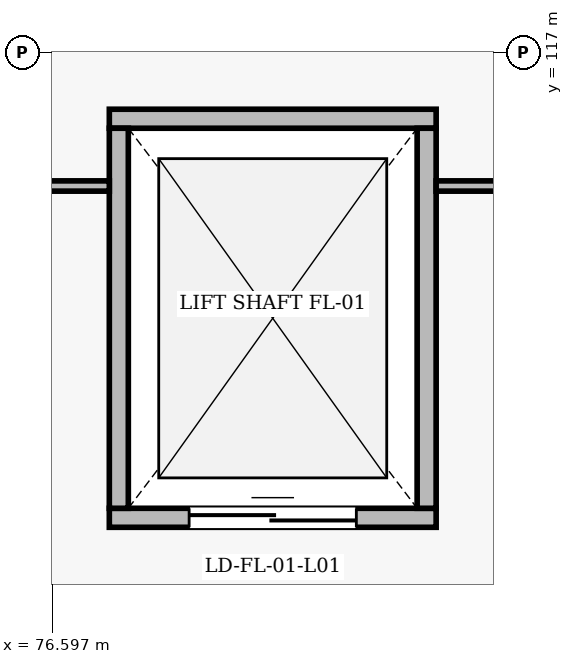
"""IFC4 building model, lengths in metres.
Left out: names, types, materials, properties, quantities, classifications, styles, units other than length and angle.
Written with IfcOpenShell. Run it as: python <this file> out.ifc"""

import sys

from ifc_helpers import new_model, si_unit, direction, frame, frame_2d, origin, place, context, subcontext, project, spatial, rectangle, extrude, element, fill, save


model = new_model("IFC4")
c1 = context("Model", 3, precision=1e-05, world=origin(), true_north=direction((0.0, 1.0)))
c2 = subcontext(c1, "Body", "Model", "MODEL_VIEW")
j1 = project(units=[si_unit("LENGTHUNIT", "METRE"), si_unit("PLANEANGLEUNIT", "RADIAN")], contexts=[c1])
p1 = place(None, origin())
s1 = spatial("IfcSite", under=j1, at=p1, CompositionType="ELEMENT")
p2 = place(p1, origin())
s2 = spatial("IfcBuilding", under=s1, at=p2, CompositionType="ELEMENT")
p3 = place(p2, frame((0.0, 0.0, 5.4)))
s3 = spatial("IfcBuildingStorey", under=s2, at=p3, CompositionType="ELEMENT", Elevation=5.4)
p4 = place(p3, frame((77.35, 110.875, 0.0), z_axis=(0.0, 0.0, 1.0), x_axis=(1.0, 0.0, 0.0)))
e1 = element("IfcWall", 1, at=p4, inside=s3, PredefinedType="SOLIDWALL", context=c2, shape_type="SweptSolid", body=[
    extrude(rectangle(XDim=4.3, YDim=0.25, at=frame_2d((2.15, 0.0))), origin(), (0.0, 0.0, 1.0), 4.582),
])
p5 = place(p4, frame((1.05, 0.0, 0.0)))
e2 = element("IfcOpeningElement", 2, at=p5, cuts=e1, PredefinedType="OPENING", context=c2, shape_type="SweptSolid", body=[
    extrude(rectangle(XDim=2.2, YDim=2.5, at=frame_2d((1.1, 1.25))), frame((0.0, 0.135, 0.0), z_axis=(0.0, -1.0, 0.0), x_axis=(1.0, 0.0, 0.0)), (0.0, 0.0, 1.0), 0.27),
])
p6 = place(p3, frame((81.65, 116.125, 0.0), z_axis=(0.0, 0.0, 1.0), x_axis=(-1.0, 0.0, 0.0)))
e3 = element("IfcWall", 3, at=p6, inside=s3, PredefinedType="SOLIDWALL", context=c2, shape_type="SweptSolid", body=[
    extrude(rectangle(XDim=4.3, YDim=0.25, at=frame_2d((2.15, 0.0))), origin(), (0.0, 0.0, 1.0), 5.16),
])
for number, where, z_axis, x_axis in (
    (4, (77.475, 116.0, 0.0), (0.0, 0.0, 1.0), (0.0, -1.0, 0.0)),
    (5, (81.525, 111.0, 0.0), (0.0, 0.0, 1.0), (0.0, 1.0, 0.0)),
):
    element("IfcWall", number, at=place(p3, frame(where, z_axis=z_axis, x_axis=x_axis)), inside=s3, PredefinedType="SOLIDWALL", context=c2, shape_type="SweptSolid", body=[
        extrude(rectangle(XDim=5.0, YDim=0.25, at=frame_2d((2.5, 0.0))), origin(), (0.0, 0.0, 1.0), 4.582),
    ])
p7 = place(p3, frame((89.86, 115.24, 0.0), z_axis=(0.0, 0.0, 1.0), x_axis=(-1.0, 0.0, 0.0)))
e6 = element("IfcWall", 6, at=p7, inside=s3, PredefinedType="PARTITIONING", context=c2, shape_type="SweptSolid", body=[
    extrude(rectangle(XDim=8.21, YDim=0.135, at=frame_2d((4.105, 0.0))), origin(), (0.0, 0.0, 1.0), 4.495),
])
p8 = place(p3, frame((77.35, 115.24, 0.0), z_axis=(0.0, 0.0, 1.0), x_axis=(-1.0, 0.0, 0.0)))
e7 = element("IfcWall", 7, at=p8, inside=s3, PredefinedType="PARTITIONING", context=c2, shape_type="SweptSolid", body=[
    extrude(rectangle(XDim=32.31, YDim=0.135, at=frame_2d((16.155, 0.0))), origin(), (0.0, 0.0, 1.0), 4.417),
])
p9 = place(p8, frame((15.665, 0.0, 0.0)))
e8 = element("IfcOpeningElement", 8, at=p9, cuts=e7, PredefinedType="OPENING", context=c2, shape_type="SweptSolid", body=[
    extrude(rectangle(XDim=0.98, YDim=2.15, at=frame_2d((0.49, 1.075))), frame((0.0, 0.078, 0.0), z_axis=(0.0, -1.0, 0.0), x_axis=(1.0, 0.0, 0.0)), (0.0, 0.0, 1.0), 0.155),
])
p10 = place(p5, origin())
e9 = element("IfcDoor", 9, at=p10, inside=s3, OperationType="DOUBLE_DOOR_SLIDING", PredefinedType="DOOR", context=c2, shape_type="SweptSolid", body=[
    extrude(rectangle(XDim=2.2, YDim=2.5, at=frame_2d((1.1, 1.25))), frame((0.0, 0.025, 0.0), z_axis=(0.0, -1.0, 0.0), x_axis=(1.0, 0.0, 0.0)), (0.0, 0.0, 1.0), 0.05),
])
fill(e2, e9)
save(model, sys.argv[1])
